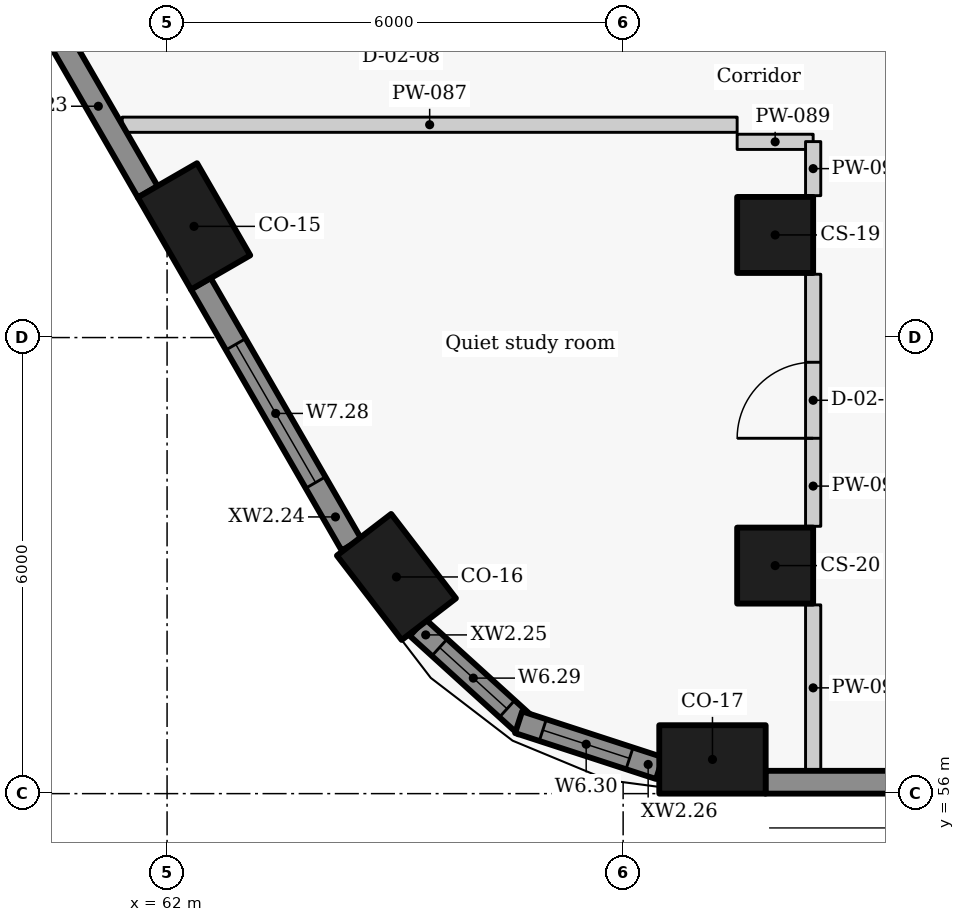
"""IFC4 building model, lengths in metres.
Left out: names, types, materials, properties, quantities, classifications, styles, units other than length and angle.
Written with IfcOpenShell. Run it as: python <this file> out.ifc"""

import sys

from ifc_helpers import new_model, si_unit, direction, frame, frame_2d, origin, origin_2d, place, context, subcontext, project, spatial, rectangle, extrude, element, fill, save


model = new_model("IFC4")
c1 = context("Model", 3, precision=1e-05, world=origin(), true_north=direction((0.0, 1.0)))
c2 = subcontext(c1, "Body", "Model", "MODEL_VIEW")
j1 = project(units=[si_unit("LENGTHUNIT", "METRE"), si_unit("PLANEANGLEUNIT", "RADIAN")], contexts=[c1])
p1 = place(None, origin())
s1 = spatial("IfcSite", under=j1, at=p1, CompositionType="ELEMENT")
p2 = place(p1, origin())
s2 = spatial("IfcBuilding", under=s1, at=p2, CompositionType="ELEMENT")
p3 = place(p2, frame((0.0, 0.0, 87.6)))
s3 = spatial("IfcBuildingStorey", under=s2, at=p3, CompositionType="ELEMENT", Elevation=87.6)
for number, where, z_axis, x_axis in (
    (1, (62.354, 63.463, 0.0), (0.0, 0.0, 1.0), (0.5, -0.866, 0.0)),
    (2, (65.018, 58.851, 0.0), (0.0, 0.0, 1.0), (0.609, -0.793, 0.0)),
    (3, (69.175, 56.45, 0.0), (0.0, 0.0, 1.0), (1.0, 0.0, 0.0)),
):
    element("IfcColumn", number, at=place(p3, frame(where, z_axis=z_axis, x_axis=x_axis)), inside=s3, PredefinedType="COLUMN", context=c2, shape_type="SweptSolid", body=[
        extrude(rectangle(XDim=1.4, YDim=0.9, at=origin_2d()), origin(), (0.0, 0.0, 1.0), 3.3),
    ])
for number, where, z_axis, x_axis in (
    (4, (70.0, 63.35, 0.0), (0.0, 0.0, 1.0), (0.0, -1.0, 0.0)),
    (5, (70.0, 59.0, 0.0), (0.0, 0.0, 1.0), (0.0, -1.0, 0.0)),
):
    element("IfcColumn", number, at=place(p3, frame(where, z_axis=z_axis, x_axis=x_axis)), inside=s3, PredefinedType="COLUMN", context=c2, shape_type="SweptSolid", body=[
        extrude(rectangle(XDim=1.0, YDim=1.0, at=origin_2d()), origin(), (0.0, 0.0, 1.0), 3.3),
    ])
p4 = place(p3, frame((59.78, 67.323, 0.0), z_axis=(0.0, 0.0, 1.0), x_axis=(0.499957037901, -0.866050206543, 0.0)))
e6 = element("IfcWall", 6, at=p4, inside=s3, PredefinedType="SOLIDWALL", context=c2, shape_type="SweptSolid", body=[
    extrude(rectangle(XDim=3.934, YDim=0.3, at=frame_2d((1.967, 0.0))), origin(), (0.0, 0.0, 1.0), 2.425),
])
p5 = place(p4, frame((0.33, 0.0, 0.9)))
e7 = element("IfcOpeningElement", 7, at=p5, cuts=e6, PredefinedType="OPENING", context=c2, shape_type="SweptSolid", body=[
    extrude(rectangle(XDim=0.9, YDim=1.1, at=frame_2d((0.45, 0.55))), frame((0.0, 0.16, 0.0), z_axis=(0.0, -1.0, 0.0), x_axis=(1.0, 0.0, 0.0)), (0.0, 0.0, 1.0), 0.32),
])
p6 = place(p3, frame((62.443, 62.71, 0.0), z_axis=(0.0, 0.0, 1.0), x_axis=(0.500043828347, -0.866000097998, 0.0)))
e8 = element("IfcWall", 8, at=p6, inside=s3, PredefinedType="SOLIDWALL", context=c2, shape_type="SweptSolid", body=[
    extrude(rectangle(XDim=3.968, YDim=0.3, at=frame_2d((1.984, 0.0))), origin(), (0.0, 0.0, 1.0), 2.425),
])
p7 = place(p6, frame((0.922, 0.0, 0.9)))
e9 = element("IfcOpeningElement", 9, at=p7, cuts=e8, PredefinedType="OPENING", context=c2, shape_type="SweptSolid", body=[
    extrude(rectangle(XDim=2.1, YDim=1.1, at=frame_2d((1.05, 0.55))), frame((0.0, 0.16, 0.0), z_axis=(0.0, -1.0, 0.0), x_axis=(1.0, 0.0, 0.0)), (0.0, 0.0, 1.0), 0.32),
])
p8 = place(p3, frame((65.295, 58.186, 0.0), z_axis=(0.0, 0.0, 1.0), x_axis=(0.740421367382, -0.672142989791, 0.0)))
e10 = element("IfcWall", 10, at=p8, inside=s3, PredefinedType="SOLIDWALL", context=c2, shape_type="SweptSolid", body=[
    extrude(rectangle(XDim=1.927, YDim=0.3, at=frame_2d((0.964, 0.0))), origin(), (0.0, 0.0, 1.0), 2.425),
])
p9 = place(p8, frame((0.391, 0.0, 0.9)))
e11 = element("IfcOpeningElement", 11, at=p9, cuts=e10, PredefinedType="OPENING", context=c2, shape_type="SweptSolid", body=[
    extrude(rectangle(XDim=1.2, YDim=1.1, at=frame_2d((0.6, 0.55))), frame((0.0, 0.16, 0.0), z_axis=(0.0, -1.0, 0.0), x_axis=(1.0, 0.0, 0.0)), (0.0, 0.0, 1.0), 0.32),
])
p10 = place(p3, frame((66.625, 56.939, 0.0), z_axis=(0.0, 0.0, 1.0), x_axis=(0.950777961763, -0.309872985958, 0.0)))
e12 = element("IfcWall", 12, at=p10, inside=s3, PredefinedType="SOLIDWALL", context=c2, shape_type="SweptSolid", body=[
    extrude(rectangle(XDim=1.95, YDim=0.3, at=frame_2d((0.975, 0.0))), origin(), (0.0, 0.0, 1.0), 2.425),
])
p11 = place(p10, frame((0.335, 0.0, 0.9)))
e13 = element("IfcOpeningElement", 13, at=p11, cuts=e12, PredefinedType="OPENING", context=c2, shape_type="SweptSolid", body=[
    extrude(rectangle(XDim=1.2, YDim=1.1, at=frame_2d((0.6, 0.55))), frame((0.0, 0.16, 0.0), z_axis=(0.0, -1.0, 0.0), x_axis=(1.0, 0.0, 0.0)), (0.0, 0.0, 1.0), 0.32),
])
p12 = place(p3, frame((69.871, 56.15, 0.0), z_axis=(0.0, 0.0, 1.0), x_axis=(1.0, 0.0, 0.0)))
e14 = element("IfcWall", 14, at=p12, inside=s3, PredefinedType="SOLIDWALL", context=c2, shape_type="SweptSolid", body=[
    extrude(rectangle(XDim=19.94, YDim=0.3, at=frame_2d((9.97, 0.0))), origin(), (0.0, 0.0, 1.0), 2.425),
])
p13 = place(p3, frame((61.409, 64.8, 0.0), z_axis=(0.0, 0.0, 1.0), x_axis=(1.0, 0.0, 0.0)))
e15 = element("IfcWall", 15, at=p13, inside=s3, PredefinedType="PARTITIONING", context=c2, shape_type="SweptSolid", body=[
    extrude(rectangle(XDim=8.091, YDim=0.2, at=frame_2d((4.045, 0.0))), origin(), (0.0, 0.0, 1.0), 2.405),
])
p14 = place(p3, frame((69.5, 64.575, 0.0), z_axis=(0.0, 0.0, 1.0), x_axis=(1.0, 0.0, 0.0)))
e16 = element("IfcWall", 16, at=p14, inside=s3, PredefinedType="PARTITIONING", context=c2, shape_type="SweptSolid", body=[
    extrude(rectangle(XDim=1.0, YDim=0.2, at=frame_2d((0.5, 0.0))), origin(), (0.0, 0.0, 1.0), 2.505),
])
p15 = place(p3, frame((70.5, 56.3, 0.0), z_axis=(0.0, 0.0, 1.0), x_axis=(0.0, 1.0, 0.0)))
e17 = element("IfcWall", 17, at=p15, inside=s3, PredefinedType="PARTITIONING", context=c2, shape_type="SweptSolid", body=[
    extrude(rectangle(XDim=2.183, YDim=0.2, at=frame_2d((1.091, 0.0))), origin(), (0.0, 0.0, 1.0), 3.025),
])
p16 = place(p3, frame((70.5, 59.517, 0.0), z_axis=(0.0, 0.0, 1.0), x_axis=(0.0, 1.0, 0.0)))
e18 = element("IfcWall", 18, at=p16, inside=s3, PredefinedType="PARTITIONING", context=c2, shape_type="SweptSolid", body=[
    extrude(rectangle(XDim=3.316, YDim=0.2, at=frame_2d((1.658, 0.0))), origin(), (0.0, 0.0, 1.0), 3.025),
])
p17 = place(p16, frame((1.158, 0.0, 0.0)))
e19 = element("IfcOpeningElement", 19, at=p17, cuts=e18, PredefinedType="OPENING", context=c2, shape_type="SweptSolid", body=[
    extrude(rectangle(XDim=1.0, YDim=2.1, at=frame_2d((0.5, 1.05))), frame((0.0, 0.11, 0.0), z_axis=(0.0, -1.0, 0.0), x_axis=(1.0, 0.0, 0.0)), (0.0, 0.0, 1.0), 0.22),
])
p18 = place(p3, frame((70.5, 63.867, 0.0), z_axis=(0.0, 0.0, 1.0), x_axis=(0.0, 1.0, 0.0)))
e20 = element("IfcWall", 20, at=p18, inside=s3, PredefinedType="PARTITIONING", context=c2, shape_type="SweptSolid", body=[
    extrude(rectangle(XDim=0.711, YDim=0.2, at=frame_2d((0.355, 0.0))), origin(), (0.0, 0.0, 1.0), 3.025),
])
p19 = place(p7, origin())
e21 = element("IfcWindow", 21, at=p19, inside=s3, PartitioningType="SINGLE_PANEL", PredefinedType="WINDOW", context=c2, shape_type="SweptSolid", body=[
    extrude(rectangle(XDim=2.1, YDim=1.1, at=frame_2d((1.05, 0.55))), frame((0.0, 0.03, 0.0), z_axis=(0.0, -1.0, 0.0), x_axis=(1.0, 0.0, 0.0)), (0.0, 0.0, 1.0), 0.06),
])
fill(e9, e21)
p20 = place(p9, origin())
e22 = element("IfcWindow", 22, at=p20, inside=s3, PartitioningType="SINGLE_PANEL", PredefinedType="WINDOW", context=c2, shape_type="SweptSolid", body=[
    extrude(rectangle(XDim=1.2, YDim=1.1, at=frame_2d((0.6, 0.55))), frame((0.0, 0.03, 0.0), z_axis=(0.0, -1.0, 0.0), x_axis=(1.0, 0.0, 0.0)), (0.0, 0.0, 1.0), 0.06),
])
fill(e11, e22)
p21 = place(p11, origin())
e23 = element("IfcWindow", 23, at=p21, inside=s3, PartitioningType="SINGLE_PANEL", PredefinedType="WINDOW", context=c2, shape_type="SweptSolid", body=[
    extrude(rectangle(XDim=1.2, YDim=1.1, at=frame_2d((0.6, 0.55))), frame((0.0, 0.03, 0.0), z_axis=(0.0, -1.0, 0.0), x_axis=(1.0, 0.0, 0.0)), (0.0, 0.0, 1.0), 0.06),
])
fill(e13, e23)
p22 = place(p17, origin())
e24 = element("IfcDoor", 24, at=p22, inside=s3, OperationType="SINGLE_SWING_LEFT", PredefinedType="DOOR", context=c2, shape_type="SweptSolid", body=[
    extrude(rectangle(XDim=1.0, YDim=2.1, at=frame_2d((0.5, 1.05))), frame((0.0, 0.025, 0.0), z_axis=(0.0, -1.0, 0.0), x_axis=(1.0, 0.0, 0.0)), (0.0, 0.0, 1.0), 0.05),
])
fill(e19, e24)
save(model, sys.argv[1])
